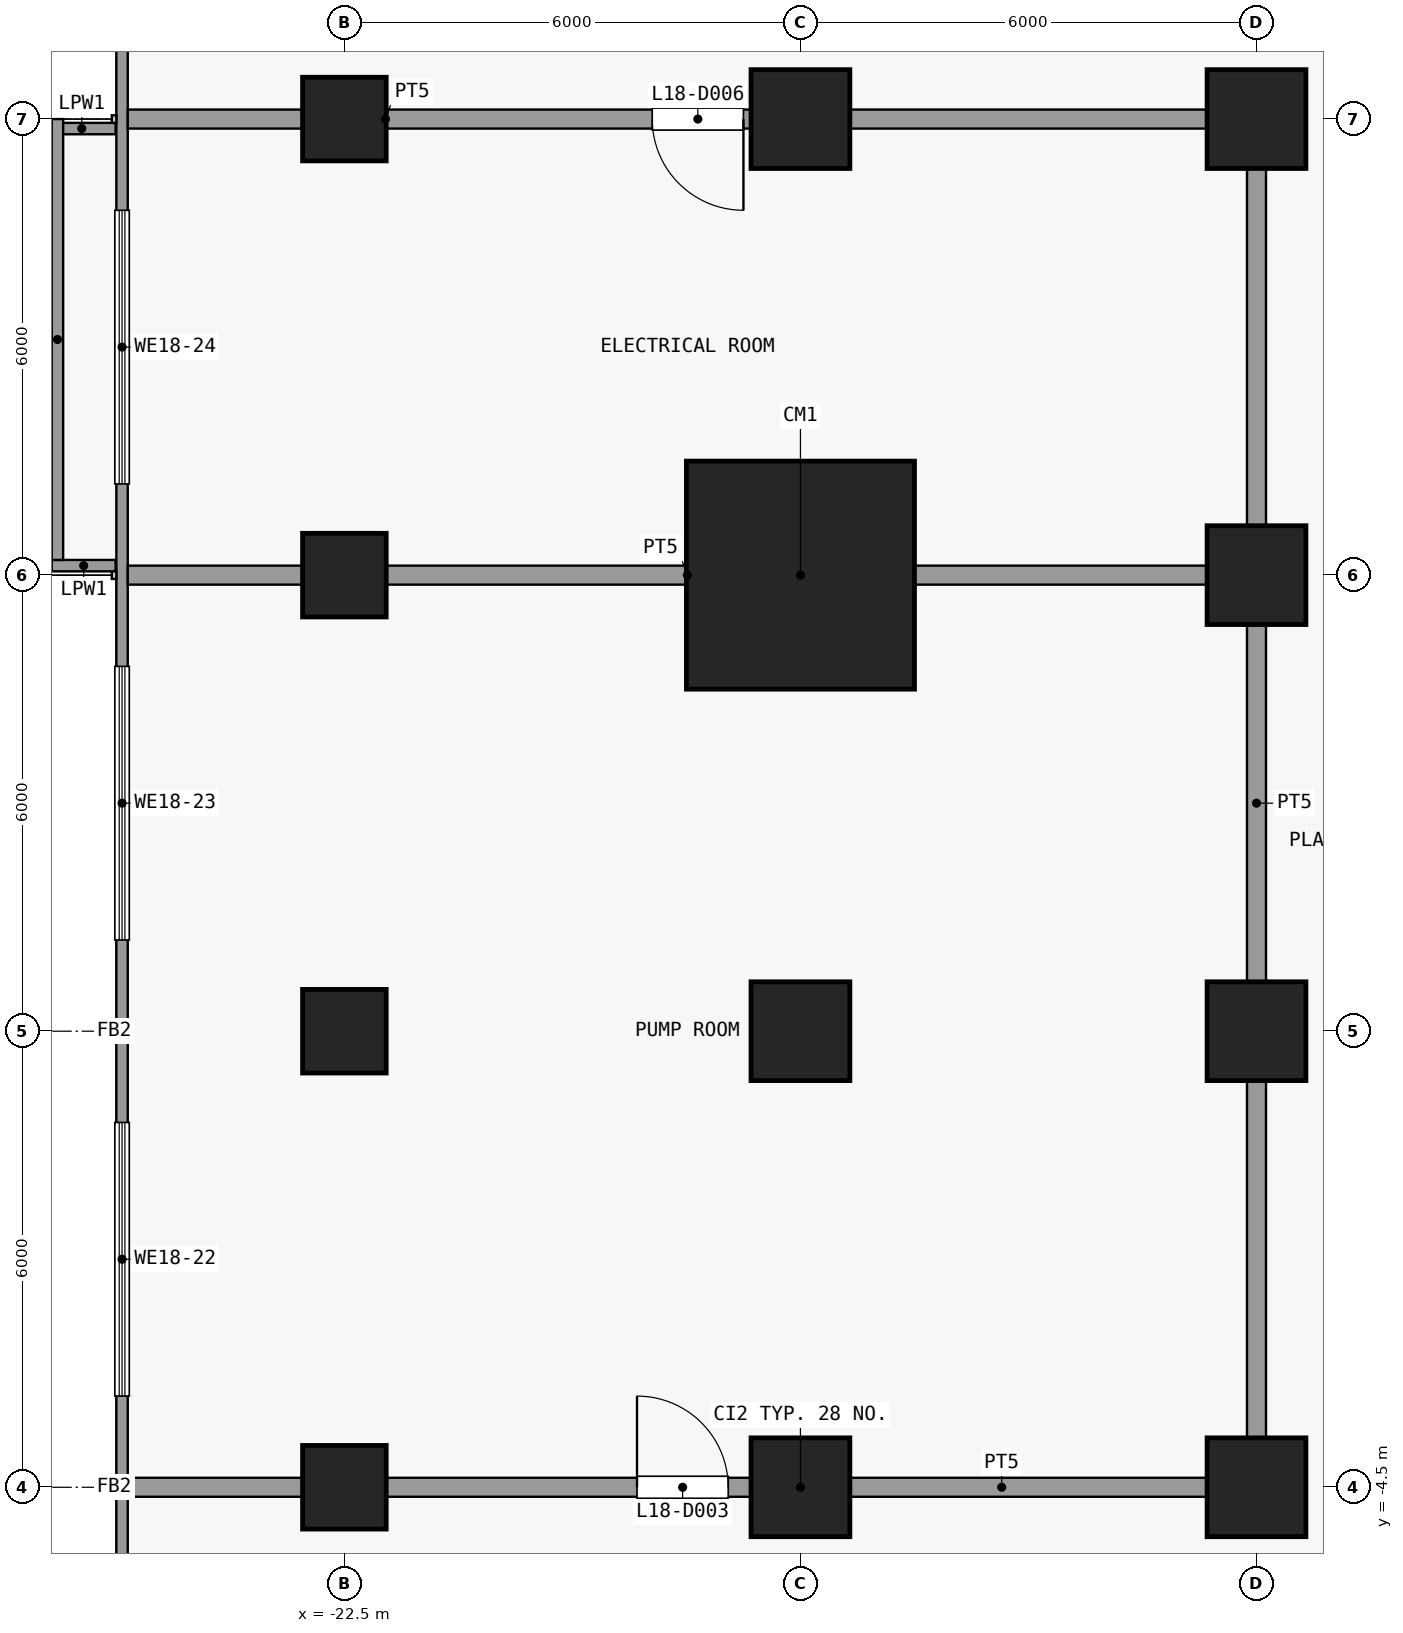
"""IFC4 building model, lengths in metres.
Left out: names, types, materials, properties, quantities, classifications, styles, units other than length and angle.
Written with IfcOpenShell. Run it as: python <this file> out.ifc"""

import sys

from ifc_helpers import new_model, si_unit, direction, frame, frame_2d, origin, origin_2d, place, context, subcontext, project, spatial, rectangle, extrude, element, fill, save


model = new_model("IFC4")
c1 = context("Model", 3, precision=1e-05, world=origin(), true_north=direction((0.0, 1.0)))
c2 = subcontext(c1, "Body", "Model", "MODEL_VIEW")
j1 = project(units=[si_unit("LENGTHUNIT", "METRE"), si_unit("PLANEANGLEUNIT", "RADIAN")], contexts=[c1])
p1 = place(None, origin())
s1 = spatial("IfcSite", under=j1, at=p1, CompositionType="ELEMENT")
p2 = place(p1, origin())
s2 = spatial("IfcBuilding", under=s1, at=p2, CompositionType="ELEMENT")
p3 = place(p2, frame((0.0, 0.0, 75.7)))
s3 = spatial("IfcBuildingStorey", under=s2, at=p3, CompositionType="ELEMENT", Elevation=75.7)
for number, where, z_axis, x_axis in (
    (1, (-22.5, -4.5, 0.0), (0.0, 0.0, 1.0), (1.0, 0.0, 0.0)),
    (2, (-22.5, 1.5, 0.0), (0.0, 0.0, 1.0), (1.0, 0.0, 0.0)),
    (3, (-22.5, 7.5, 0.0), (0.0, 0.0, 1.0), (1.0, 0.0, 0.0)),
    (4, (-22.5, 13.5, 0.0), (0.0, 0.0, 1.0), (1.0, 0.0, 0.0)),
):
    element("IfcColumn", number, at=place(p3, frame(where, z_axis=z_axis, x_axis=x_axis)), inside=s3, PredefinedType="COLUMN", context=c2, shape_type="SweptSolid", body=[
        extrude(rectangle(XDim=1.1, YDim=1.1, at=origin_2d()), origin(), (0.0, 0.0, 1.0), 5.4),
    ])
for number, where, z_axis, x_axis in (
    (5, (-16.5, -4.5, 0.0), (0.0, 0.0, 1.0), (1.0, 0.0, 0.0)),
    (6, (-16.5, 1.5, 0.0), (0.0, 0.0, 1.0), (1.0, 0.0, 0.0)),
):
    element("IfcColumn", number, at=place(p3, frame(where, z_axis=z_axis, x_axis=x_axis)), inside=s3, PredefinedType="COLUMN", context=c2, shape_type="SweptSolid", body=[
        extrude(rectangle(XDim=1.3, YDim=1.3, at=origin_2d()), origin(), (0.0, 0.0, 1.0), 5.4),
    ])
p4 = place(p3, frame((-16.5, 7.5, 0.0), z_axis=(0.0, 0.0, 1.0), x_axis=(1.0, 0.0, 0.0)))
e7 = element("IfcColumn", 7, at=p4, inside=s3, PredefinedType="COLUMN", context=c2, shape_type="SweptSolid", body=[
    extrude(rectangle(XDim=3.0, YDim=3.0, at=origin_2d()), origin(), (0.0, 0.0, 1.0), 5.4),
])
for number, where, z_axis, x_axis in (
    (8, (-16.5, 13.5, 0.0), (0.0, 0.0, 1.0), (1.0, 0.0, 0.0)),
    (9, (-10.5, -4.5, 0.0), (0.0, 0.0, 1.0), (1.0, 0.0, 0.0)),
    (10, (-10.5, 1.5, 0.0), (0.0, 0.0, 1.0), (1.0, 0.0, 0.0)),
    (11, (-10.5, 7.5, 0.0), (0.0, 0.0, 1.0), (1.0, 0.0, 0.0)),
    (12, (-10.5, 13.5, 0.0), (0.0, 0.0, 1.0), (1.0, 0.0, 0.0)),
):
    element("IfcColumn", number, at=place(p3, frame(where, z_axis=z_axis, x_axis=x_axis)), inside=s3, PredefinedType="COLUMN", context=c2, shape_type="SweptSolid", body=[
        extrude(rectangle(XDim=1.3, YDim=1.3, at=origin_2d()), origin(), (0.0, 0.0, 1.0), 5.4),
    ])
p5 = place(p3, frame((-25.425, -22.35, 0.0), z_axis=(0.0, 0.0, 1.0), x_axis=(0.0, 1.0, 0.0)))
e13 = element("IfcWall", 13, at=p5, inside=s3, PredefinedType="SOLIDWALL", context=c2, shape_type="SweptSolid", body=[
    extrude(rectangle(XDim=47.7, YDim=0.15, at=frame_2d((23.85, 0.0))), origin(), (0.0, 0.0, 1.0), 5.2),
])
p6 = place(p5, frame((2.625, 0.0, 1.2)))
e14 = element("IfcOpeningElement", 14, at=p6, cuts=e13, PredefinedType="OPENING", context=c2, shape_type="SweptSolid", body=[
    extrude(rectangle(XDim=3.6, YDim=3.0, at=frame_2d((1.8, 1.5))), frame((0.0, 0.085, 0.0), z_axis=(0.0, -1.0, 0.0), x_axis=(1.0, 0.0, 0.0)), (0.0, 0.0, 1.0), 0.17),
])
p7 = place(p5, frame((11.55, 0.0, 1.2)))
e15 = element("IfcOpeningElement", 15, at=p7, cuts=e13, PredefinedType="OPENING", context=c2, shape_type="SweptSolid", body=[
    extrude(rectangle(XDim=2.625, YDim=3.0, at=frame_2d((1.312, 1.5))), frame((0.0, 0.085, 0.0), z_axis=(0.0, -1.0, 0.0), x_axis=(1.0, 0.0, 0.0)), (0.0, 0.0, 1.0), 0.17),
])
p8 = place(p5, frame((19.05, 0.0, 1.2)))
e16 = element("IfcOpeningElement", 16, at=p8, cuts=e13, PredefinedType="OPENING", context=c2, shape_type="SweptSolid", body=[
    extrude(rectangle(XDim=3.6, YDim=3.0, at=frame_2d((1.8, 1.5))), frame((0.0, 0.085, 0.0), z_axis=(0.0, -1.0, 0.0), x_axis=(1.0, 0.0, 0.0)), (0.0, 0.0, 1.0), 0.17),
])
p9 = place(p5, frame((25.05, 0.0, 1.2)))
e17 = element("IfcOpeningElement", 17, at=p9, cuts=e13, PredefinedType="OPENING", context=c2, shape_type="SweptSolid", body=[
    extrude(rectangle(XDim=3.6, YDim=3.0, at=frame_2d((1.8, 1.5))), frame((0.0, 0.085, 0.0), z_axis=(0.0, -1.0, 0.0), x_axis=(1.0, 0.0, 0.0)), (0.0, 0.0, 1.0), 0.17),
])
p10 = place(p5, frame((31.05, 0.0, 1.2)))
e18 = element("IfcOpeningElement", 18, at=p10, cuts=e13, PredefinedType="OPENING", context=c2, shape_type="SweptSolid", body=[
    extrude(rectangle(XDim=3.6, YDim=3.0, at=frame_2d((1.8, 1.5))), frame((0.0, 0.085, 0.0), z_axis=(0.0, -1.0, 0.0), x_axis=(1.0, 0.0, 0.0)), (0.0, 0.0, 1.0), 0.17),
])
p11 = place(p5, frame((37.05, 0.0, 1.2)))
e19 = element("IfcOpeningElement", 19, at=p11, cuts=e13, PredefinedType="OPENING", context=c2, shape_type="SweptSolid", body=[
    extrude(rectangle(XDim=1.525, YDim=3.0, at=frame_2d((0.762, 1.5))), frame((0.0, 0.085, 0.0), z_axis=(0.0, -1.0, 0.0), x_axis=(1.0, 0.0, 0.0)), (0.0, 0.0, 1.0), 0.17),
])
p12 = place(p5, frame((39.125, 0.0, 1.2)))
e20 = element("IfcOpeningElement", 20, at=p12, cuts=e13, PredefinedType="OPENING", context=c2, shape_type="SweptSolid", body=[
    extrude(rectangle(XDim=1.525, YDim=3.0, at=frame_2d((0.762, 1.5))), frame((0.0, 0.085, 0.0), z_axis=(0.0, -1.0, 0.0), x_axis=(1.0, 0.0, 0.0)), (0.0, 0.0, 1.0), 0.17),
])
p13 = place(p5, frame((42.975, 0.0, 1.2)))
e21 = element("IfcOpeningElement", 21, at=p13, cuts=e13, PredefinedType="OPENING", context=c2, shape_type="SweptSolid", body=[
    extrude(rectangle(XDim=3.6, YDim=3.0, at=frame_2d((1.8, 1.5))), frame((0.0, 0.085, 0.0), z_axis=(0.0, -1.0, 0.0), x_axis=(1.0, 0.0, 0.0)), (0.0, 0.0, 1.0), 0.17),
])
p14 = place(p3, frame((-26.4, 13.375, 0.0), z_axis=(0.0, 0.0, 1.0), x_axis=(1.0, 0.0, 0.0)))
e22 = element("IfcWall", 22, at=p14, inside=s3, PredefinedType="PARAPET", context=c2, shape_type="SweptSolid", body=[
    extrude(rectangle(XDim=0.89, YDim=0.15, at=frame_2d((0.445, 0.0))), origin(), (0.0, 0.0, 1.0), 1.15),
])
p15 = place(p3, frame((-25.51, 7.625, 0.0), z_axis=(0.0, 0.0, 1.0), x_axis=(-1.0, 0.0, 0.0)))
e23 = element("IfcWall", 23, at=p15, inside=s3, PredefinedType="PARAPET", context=c2, shape_type="SweptSolid", body=[
    extrude(rectangle(XDim=0.84, YDim=0.15, at=frame_2d((0.42, 0.0))), origin(), (0.0, 0.0, 1.0), 1.15),
])
p16 = place(p3, frame((-26.275, 7.7, 0.0), z_axis=(0.0, 0.0, 1.0), x_axis=(0.0, 1.0, 0.0)))
e24 = element("IfcWall", 24, at=p16, inside=s3, PredefinedType="PARAPET", context=c2, shape_type="SweptSolid", body=[
    extrude(rectangle(XDim=5.8, YDim=0.15, at=frame_2d((2.9, 0.0))), origin(), (0.0, 0.0, 1.0), 1.15),
])
p17 = place(p3, frame((-25.35, -4.5, 0.0), z_axis=(0.0, 0.0, 1.0), x_axis=(1.0, 0.0, 0.0)))
e25 = element("IfcWall", 25, at=p17, inside=s3, PredefinedType="PARTITIONING", context=c2, shape_type="SweptSolid", body=[
    extrude(rectangle(XDim=14.975, YDim=0.25, at=frame_2d((7.488, 0.0))), origin(), (0.0, 0.0, 1.0), 5.0),
])
p18 = place(p17, frame((6.7, 0.0, 0.0)))
e26 = element("IfcOpeningElement", 26, at=p18, cuts=e25, PredefinedType="OPENING", context=c2, shape_type="SweptSolid", body=[
    extrude(rectangle(XDim=1.2, YDim=2.1, at=frame_2d((0.6, 1.05))), frame((0.0, 0.135, 0.0), z_axis=(0.0, -1.0, 0.0), x_axis=(1.0, 0.0, 0.0)), (0.0, 0.0, 1.0), 0.27),
])
p19 = place(p3, frame((-25.35, 7.5, 0.0), z_axis=(0.0, 0.0, 1.0), x_axis=(1.0, 0.0, 0.0)))
e27 = element("IfcWall", 27, at=p19, inside=s3, PredefinedType="PARTITIONING", context=c2, shape_type="SweptSolid", body=[
    extrude(rectangle(XDim=14.725, YDim=0.25, at=frame_2d((7.363, 0.0))), origin(), (0.0, 0.0, 1.0), 5.0),
])
p20 = place(p3, frame((-25.35, 13.5, 0.0), z_axis=(0.0, 0.0, 1.0), x_axis=(1.0, 0.0, 0.0)))
e28 = element("IfcWall", 28, at=p20, inside=s3, PredefinedType="PARTITIONING", context=c2, shape_type="SweptSolid", body=[
    extrude(rectangle(XDim=14.975, YDim=0.25, at=frame_2d((7.488, 0.0))), origin(), (0.0, 0.0, 1.0), 5.0),
])
p21 = place(p20, frame((6.9, 0.0, 0.0)))
e29 = element("IfcOpeningElement", 29, at=p21, cuts=e28, PredefinedType="OPENING", context=c2, shape_type="SweptSolid", body=[
    extrude(rectangle(XDim=1.2, YDim=2.1, at=frame_2d((0.6, 1.05))), frame((0.0, 0.135, 0.0), z_axis=(0.0, -1.0, 0.0), x_axis=(1.0, 0.0, 0.0)), (0.0, 0.0, 1.0), 0.27),
])
p22 = place(p3, frame((-10.5, -4.375, 0.0), z_axis=(0.0, 0.0, 1.0), x_axis=(0.0, 1.0, 0.0)))
e30 = element("IfcWall", 30, at=p22, inside=s3, PredefinedType="PARTITIONING", context=c2, shape_type="SweptSolid", body=[
    extrude(rectangle(XDim=17.75, YDim=0.25, at=frame_2d((8.875, 0.0))), origin(), (0.0, 0.0, 1.0), 5.0),
])
p23 = place(p8, origin())
e31 = element("IfcWindow", 31, at=p23, inside=s3, PartitioningType="SINGLE_PANEL", PredefinedType="WINDOW", context=c2, shape_type="SweptSolid", body=[
    extrude(rectangle(XDim=3.6, YDim=3.0, at=frame_2d((1.8, 1.5))), frame((0.0, 0.03, 0.0), z_axis=(0.0, -1.0, 0.0), x_axis=(1.0, 0.0, 0.0)), (0.0, 0.0, 1.0), 0.06),
])
fill(e16, e31)
p24 = place(p9, origin())
e32 = element("IfcWindow", 32, at=p24, inside=s3, PartitioningType="SINGLE_PANEL", PredefinedType="WINDOW", context=c2, shape_type="SweptSolid", body=[
    extrude(rectangle(XDim=3.6, YDim=3.0, at=frame_2d((1.8, 1.5))), frame((0.0, 0.03, 0.0), z_axis=(0.0, -1.0, 0.0), x_axis=(1.0, 0.0, 0.0)), (0.0, 0.0, 1.0), 0.06),
])
fill(e17, e32)
p25 = place(p10, origin())
e33 = element("IfcWindow", 33, at=p25, inside=s3, PartitioningType="SINGLE_PANEL", PredefinedType="WINDOW", context=c2, shape_type="SweptSolid", body=[
    extrude(rectangle(XDim=3.6, YDim=3.0, at=frame_2d((1.8, 1.5))), frame((0.0, 0.03, 0.0), z_axis=(0.0, -1.0, 0.0), x_axis=(1.0, 0.0, 0.0)), (0.0, 0.0, 1.0), 0.06),
])
fill(e18, e33)
p26 = place(p18, origin())
e34 = element("IfcDoor", 34, at=p26, inside=s3, OperationType="SINGLE_SWING_RIGHT", PredefinedType="DOOR", context=c2, shape_type="SweptSolid", body=[
    extrude(rectangle(XDim=1.2, YDim=2.1, at=frame_2d((0.6, 1.05))), frame((0.0, 0.025, 0.0), z_axis=(0.0, -1.0, 0.0), x_axis=(1.0, 0.0, 0.0)), (0.0, 0.0, 1.0), 0.05),
])
fill(e26, e34)
p27 = place(p21, origin())
e35 = element("IfcDoor", 35, at=p27, inside=s3, OperationType="SINGLE_SWING_RIGHT", PredefinedType="DOOR", context=c2, shape_type="SweptSolid", body=[
    extrude(rectangle(XDim=1.2, YDim=2.1, at=frame_2d((0.6, 1.05))), frame((0.0, 0.025, 0.0), z_axis=(0.0, -1.0, 0.0), x_axis=(1.0, 0.0, 0.0)), (0.0, 0.0, 1.0), 0.05),
])
fill(e29, e35)
save(model, sys.argv[1])
